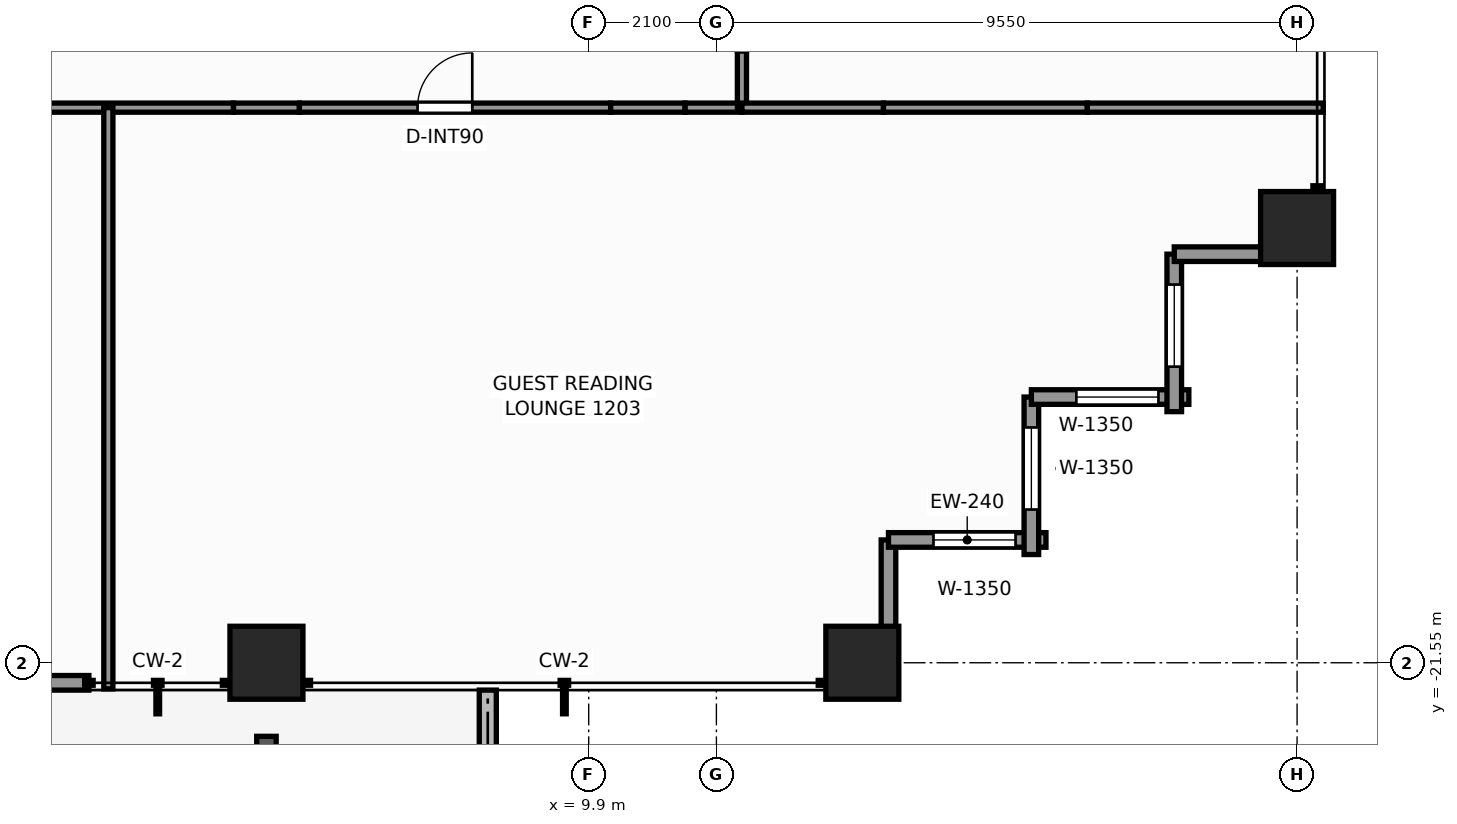
"""IFC4 building model, lengths in metres.
Left out: names, types, materials, properties, quantities, classifications, styles, units other than length and angle.
Written with IfcOpenShell. Run it as: python <this file> out.ifc"""

import sys

from ifc_helpers import new_model, si_unit, direction, frame, frame_2d, origin, origin_2d, place, context, subcontext, project, spatial, rectangle, extrude, element, fill, save


model = new_model("IFC4")
c1 = context("Model", 3, precision=1e-05, world=origin(), true_north=direction((0.0, 1.0)))
c2 = subcontext(c1, "Body", "Model", "MODEL_VIEW")
j1 = project(units=[si_unit("LENGTHUNIT", "METRE"), si_unit("PLANEANGLEUNIT", "RADIAN")], contexts=[c1])
p1 = place(None, origin())
s1 = spatial("IfcSite", under=j1, at=p1, CompositionType="ELEMENT")
p2 = place(p1, origin())
s2 = spatial("IfcBuilding", under=s1, at=p2, CompositionType="ELEMENT")
p3 = place(p2, frame((0.0, 0.0, 43.6)))
s3 = spatial("IfcBuildingStorey", under=s2, at=p3, CompositionType="ELEMENT", Elevation=43.6)
for number, where, z_axis, x_axis in (
    (1, (4.6, -21.55, 0.0), (0.0, 0.0, 1.0), (1.0, 0.0, 0.0)),
    (2, (14.4, -21.55, 0.0), (0.0, 0.0, 1.0), (1.0, 0.0, 0.0)),
    (3, (21.55, -14.4, 0.0), (0.0, 0.0, 1.0), (1.0, 0.0, 0.0)),
):
    element("IfcColumn", number, at=place(p3, frame(where, z_axis=z_axis, x_axis=x_axis)), inside=s3, PredefinedType="COLUMN", context=c2, shape_type="SweptSolid", body=[
        extrude(rectangle(XDim=1.2, YDim=1.2, at=origin_2d()), origin(), (0.0, 0.0, 1.0), 3.3),
    ])
p4 = place(p3, frame((8.24, -24.674, -0.06), z_axis=(0.0, 0.0, 1.0), x_axis=(0.0, 1.0, 0.0)))
e4 = element("IfcWall", 4, at=p4, inside=s3, PredefinedType="PARAPET", context=c2, shape_type="SweptSolid", body=[
    extrude(rectangle(XDim=2.674, YDim=0.28, at=frame_2d((1.337, 0.0))), origin(), (0.0, 0.0, 1.0), 0.42),
])
p5 = place(p3, frame((1.68, -21.88, 0.0), z_axis=(0.0, 0.0, 1.0), x_axis=(-1.0, 0.0, 0.0)))
e5 = element("IfcWall", 5, at=p5, inside=s3, PredefinedType="STANDARD", context=c2, shape_type="SweptSolid", body=[
    extrude(rectangle(XDim=3.36, YDim=0.24, at=frame_2d((1.68, 0.0))), origin(), (0.0, 0.0, 1.0), 3.06),
])
p6 = place(p5, frame((0.78, 0.0, 0.0)))
e6 = element("IfcOpeningElement", 6, at=p6, cuts=e5, PredefinedType="OPENING", context=c2, shape_type="SweptSolid", body=[
    extrude(rectangle(XDim=1.8, YDim=2.2, at=frame_2d((0.9, 1.1))), frame((0.0, 0.13, 0.0), z_axis=(0.0, -1.0, 0.0), x_axis=(1.0, 0.0, 0.0)), (0.0, 0.0, 1.0), 0.26),
])
p7 = place(p3, frame((14.83, -19.53, 0.0), z_axis=(0.0, 0.0, 1.0), x_axis=(0.0, -1.0, 0.0)))
e7 = element("IfcWall", 7, at=p7, inside=s3, PredefinedType="STANDARD", context=c2, shape_type="SweptSolid", body=[
    extrude(rectangle(XDim=2.59, YDim=0.24, at=frame_2d((1.295, 0.0))), origin(), (0.0, 0.0, 1.0), 1.555),
])
p8 = place(p3, frame((17.42, -19.53, 0.0), z_axis=(0.0, 0.0, 1.0), x_axis=(-1.0, 0.0, 0.0)))
e8 = element("IfcWall", 8, at=p8, inside=s3, PredefinedType="STANDARD", context=c2, shape_type="SweptSolid", body=[
    extrude(rectangle(XDim=2.59, YDim=0.24, at=frame_2d((1.295, 0.0))), origin(), (0.0, 0.0, 1.0), 2.439),
])
p9 = place(p8, frame((0.5, 0.0, 0.65)))
e9 = element("IfcOpeningElement", 9, at=p9, cuts=e8, PredefinedType="OPENING", context=c2, shape_type="SweptSolid", body=[
    extrude(rectangle(XDim=1.35, YDim=1.55, at=frame_2d((0.675, 0.775))), frame((0.0, 0.13, 0.0), z_axis=(0.0, -1.0, 0.0), x_axis=(1.0, 0.0, 0.0)), (0.0, 0.0, 1.0), 0.26),
])
p10 = place(p3, frame((17.18, -17.18, 0.0), z_axis=(0.0, 0.0, 1.0), x_axis=(0.0, -1.0, 0.0)))
e10 = element("IfcWall", 10, at=p10, inside=s3, PredefinedType="STANDARD", context=c2, shape_type="SweptSolid", body=[
    extrude(rectangle(XDim=2.59, YDim=0.24, at=frame_2d((1.295, 0.0))), origin(), (0.0, 0.0, 1.0), 2.439),
])
p11 = place(p10, frame((0.5, 0.0, 0.65)))
e11 = element("IfcOpeningElement", 11, at=p11, cuts=e10, PredefinedType="OPENING", context=c2, shape_type="SweptSolid", body=[
    extrude(rectangle(XDim=1.35, YDim=1.55, at=frame_2d((0.675, 0.775))), frame((0.0, 0.13, 0.0), z_axis=(0.0, -1.0, 0.0), x_axis=(1.0, 0.0, 0.0)), (0.0, 0.0, 1.0), 0.26),
])
p12 = place(p3, frame((19.77, -17.18, 0.0), z_axis=(0.0, 0.0, 1.0), x_axis=(-1.0, 0.0, 0.0)))
e12 = element("IfcWall", 12, at=p12, inside=s3, PredefinedType="STANDARD", context=c2, shape_type="SweptSolid", body=[
    extrude(rectangle(XDim=2.59, YDim=0.24, at=frame_2d((1.295, 0.0))), origin(), (0.0, 0.0, 1.0), 2.439),
])
p13 = place(p12, frame((0.5, 0.0, 0.65)))
e13 = element("IfcOpeningElement", 13, at=p13, cuts=e12, PredefinedType="OPENING", context=c2, shape_type="SweptSolid", body=[
    extrude(rectangle(XDim=1.35, YDim=1.55, at=frame_2d((0.675, 0.775))), frame((0.0, 0.13, 0.0), z_axis=(0.0, -1.0, 0.0), x_axis=(1.0, 0.0, 0.0)), (0.0, 0.0, 1.0), 0.26),
])
p14 = place(p3, frame((19.53, -14.83, 0.0), z_axis=(0.0, 0.0, 1.0), x_axis=(0.0, -1.0, 0.0)))
e14 = element("IfcWall", 14, at=p14, inside=s3, PredefinedType="STANDARD", context=c2, shape_type="SweptSolid", body=[
    extrude(rectangle(XDim=2.59, YDim=0.24, at=frame_2d((1.295, 0.0))), origin(), (0.0, 0.0, 1.0), 2.439),
])
p15 = place(p14, frame((0.5, 0.0, 0.65)))
e15 = element("IfcOpeningElement", 15, at=p15, cuts=e14, PredefinedType="OPENING", context=c2, shape_type="SweptSolid", body=[
    extrude(rectangle(XDim=1.35, YDim=1.55, at=frame_2d((0.675, 0.775))), frame((0.0, 0.13, 0.0), z_axis=(0.0, -1.0, 0.0), x_axis=(1.0, 0.0, 0.0)), (0.0, 0.0, 1.0), 0.26),
])
p16 = place(p3, frame((22.12, -14.83, 0.0), z_axis=(0.0, 0.0, 1.0), x_axis=(-1.0, 0.0, 0.0)))
e16 = element("IfcWall", 16, at=p16, inside=s3, PredefinedType="STANDARD", context=c2, shape_type="SweptSolid", body=[
    extrude(rectangle(XDim=2.59, YDim=0.24, at=frame_2d((1.295, 0.0))), origin(), (0.0, 0.0, 1.0), 1.555),
])
p17 = place(p3, frame((-4.058, -12.42, 0.0), z_axis=(0.0, 0.0, 1.0), x_axis=(1.0, 0.0, 0.0)))
e17 = element("IfcWall", 17, at=p17, inside=s3, PredefinedType="PARTITIONING", context=c2, shape_type="SweptSolid", body=[
    extrude(rectangle(XDim=8.116, YDim=0.15, at=frame_2d((4.058, 0.0))), origin(), (0.0, 0.0, 1.0), 2.585),
])
p18 = place(p17, frame((1.578, 0.0, 0.0)))
e18 = element("IfcOpeningElement", 18, at=p18, cuts=e17, PredefinedType="OPENING", context=c2, shape_type="SweptSolid", body=[
    extrude(rectangle(XDim=0.9, YDim=2.06, at=frame_2d((0.45, 1.03))), frame((0.0, 0.085, 0.0), z_axis=(0.0, -1.0, 0.0), x_axis=(1.0, 0.0, 0.0)), (0.0, 0.0, 1.0), 0.17),
])
p19 = place(p3, frame((4.058, -12.42, 0.0), z_axis=(0.0, 0.0, 1.0), x_axis=(1.0, 0.0, 0.0)))
e19 = element("IfcWall", 19, at=p19, inside=s3, PredefinedType="PARTITIONING", context=c2, shape_type="SweptSolid", body=[
    extrude(rectangle(XDim=1.084, YDim=0.15, at=frame_2d((0.542, 0.0))), origin(), (0.0, 0.0, 1.0), 1.545),
])
p20 = place(p3, frame((5.142, -12.42, 0.0), z_axis=(0.0, 0.0, 1.0), x_axis=(1.0, 0.0, 0.0)))
e20 = element("IfcWall", 20, at=p20, inside=s3, PredefinedType="PARTITIONING", context=c2, shape_type="SweptSolid", body=[
    extrude(rectangle(XDim=5.119, YDim=0.15, at=frame_2d((2.56, 0.0))), origin(), (0.0, 0.0, 1.0), 3.06),
])
p21 = place(p20, frame((1.943, 0.0, 0.0)))
e21 = element("IfcOpeningElement", 21, at=p21, cuts=e20, PredefinedType="OPENING", context=c2, shape_type="SweptSolid", body=[
    extrude(rectangle(XDim=0.9, YDim=2.06, at=frame_2d((0.45, 1.03))), frame((0.0, 0.085, 0.0), z_axis=(0.0, -1.0, 0.0), x_axis=(1.0, 0.0, 0.0)), (0.0, 0.0, 1.0), 0.17),
])
p22 = place(p3, frame((10.261, -12.42, 0.0), z_axis=(0.0, 0.0, 1.0), x_axis=(1.0, 0.0, 0.0)))
e22 = element("IfcWall", 22, at=p22, inside=s3, PredefinedType="PARTITIONING", context=c2, shape_type="SweptSolid", body=[
    extrude(rectangle(XDim=1.225, YDim=0.15, at=frame_2d((0.612, 0.0))), origin(), (0.0, 0.0, 1.0), 1.545),
])
for number, where, z_axis, x_axis in (
    (23, (11.486, -12.42, 0.0), (0.0, 0.0, 1.0), (1.0, 0.0, 0.0)),
    (24, (12.42, -12.42, 0.0), (0.0, 0.0, 1.0), (0.0, 1.0, 0.0)),
):
    element("IfcWall", number, at=place(p3, frame(where, z_axis=z_axis, x_axis=x_axis)), inside=s3, PredefinedType="PARTITIONING", context=c2, shape_type="SweptSolid", body=[
        extrude(rectangle(XDim=0.934, YDim=0.15, at=frame_2d((0.467, 0.0))), origin(), (0.0, 0.0, 1.0), 3.06),
    ])
p23 = place(p3, frame((12.42, -12.42, 0.0), z_axis=(0.0, 0.0, 1.0), x_axis=(1.0, 0.0, 0.0)))
e25 = element("IfcWall", 25, at=p23, inside=s3, PredefinedType="PARTITIONING", context=c2, shape_type="SweptSolid", body=[
    extrude(rectangle(XDim=2.328, YDim=0.15, at=frame_2d((1.164, 0.0))), origin(), (0.0, 0.0, 1.0), 3.06),
])
p24 = place(p3, frame((14.748, -12.42, 0.0), z_axis=(0.0, 0.0, 1.0), x_axis=(1.0, 0.0, 0.0)))
e26 = element("IfcWall", 26, at=p24, inside=s3, PredefinedType="PARTITIONING", context=c2, shape_type="SweptSolid", body=[
    extrude(rectangle(XDim=3.352, YDim=0.15, at=frame_2d((1.676, 0.0))), origin(), (0.0, 0.0, 1.0), 1.545),
])
p25 = place(p3, frame((18.1, -12.42, 0.0), z_axis=(0.0, 0.0, 1.0), x_axis=(1.0, 0.0, 0.0)))
e27 = element("IfcWall", 27, at=p25, inside=s3, PredefinedType="PARTITIONING", context=c2, shape_type="SweptSolid", body=[
    extrude(rectangle(XDim=3.88, YDim=0.15, at=frame_2d((1.94, 0.0))), origin(), (0.0, 0.0, 1.0), 2.429),
])
p26 = place(p3, frame((2.0, -21.98, 0.0), z_axis=(0.0, 0.0, 1.0), x_axis=(0.0, 1.0, 0.0)))
e28 = element("IfcWall", 28, at=p26, inside=s3, PredefinedType="PARTITIONING", context=c2, shape_type="SweptSolid", body=[
    extrude(rectangle(XDim=9.56, YDim=0.15, at=frame_2d((4.78, 0.0))), origin(), (0.0, 0.0, 1.0), 2.429),
])
p27 = place(p9, origin())
e29 = element("IfcWindow", 29, at=p27, inside=s3, PartitioningType="SINGLE_PANEL", PredefinedType="WINDOW", context=c2, shape_type="SweptSolid", body=[
    extrude(rectangle(XDim=1.35, YDim=1.55, at=frame_2d((0.675, 0.775))), frame((0.0, 0.03, 0.0), z_axis=(0.0, -1.0, 0.0), x_axis=(1.0, 0.0, 0.0)), (0.0, 0.0, 1.0), 0.06),
])
fill(e9, e29)
p28 = place(p11, origin())
e30 = element("IfcWindow", 30, at=p28, inside=s3, PartitioningType="SINGLE_PANEL", PredefinedType="WINDOW", context=c2, shape_type="SweptSolid", body=[
    extrude(rectangle(XDim=1.35, YDim=1.55, at=frame_2d((0.675, 0.775))), frame((0.0, 0.03, 0.0), z_axis=(0.0, -1.0, 0.0), x_axis=(1.0, 0.0, 0.0)), (0.0, 0.0, 1.0), 0.06),
])
fill(e11, e30)
p29 = place(p13, origin())
e31 = element("IfcWindow", 31, at=p29, inside=s3, PartitioningType="SINGLE_PANEL", PredefinedType="WINDOW", context=c2, shape_type="SweptSolid", body=[
    extrude(rectangle(XDim=1.35, YDim=1.55, at=frame_2d((0.675, 0.775))), frame((0.0, 0.03, 0.0), z_axis=(0.0, -1.0, 0.0), x_axis=(1.0, 0.0, 0.0)), (0.0, 0.0, 1.0), 0.06),
])
fill(e13, e31)
p30 = place(p15, origin())
e32 = element("IfcWindow", 32, at=p30, inside=s3, PartitioningType="SINGLE_PANEL", PredefinedType="WINDOW", context=c2, shape_type="SweptSolid", body=[
    extrude(rectangle(XDim=1.35, YDim=1.55, at=frame_2d((0.675, 0.775))), frame((0.0, 0.03, 0.0), z_axis=(0.0, -1.0, 0.0), x_axis=(1.0, 0.0, 0.0)), (0.0, 0.0, 1.0), 0.06),
])
fill(e15, e32)
p31 = place(p21, origin())
e33 = element("IfcDoor", 33, at=p31, inside=s3, OperationType="SINGLE_SWING_RIGHT", PredefinedType="DOOR", context=c2, shape_type="SweptSolid", body=[
    extrude(rectangle(XDim=0.9, YDim=2.06, at=frame_2d((0.45, 1.03))), frame((0.0, 0.025, 0.0), z_axis=(0.0, -1.0, 0.0), x_axis=(1.0, 0.0, 0.0)), (0.0, 0.0, 1.0), 0.05),
])
fill(e21, e33)
save(model, sys.argv[1])
